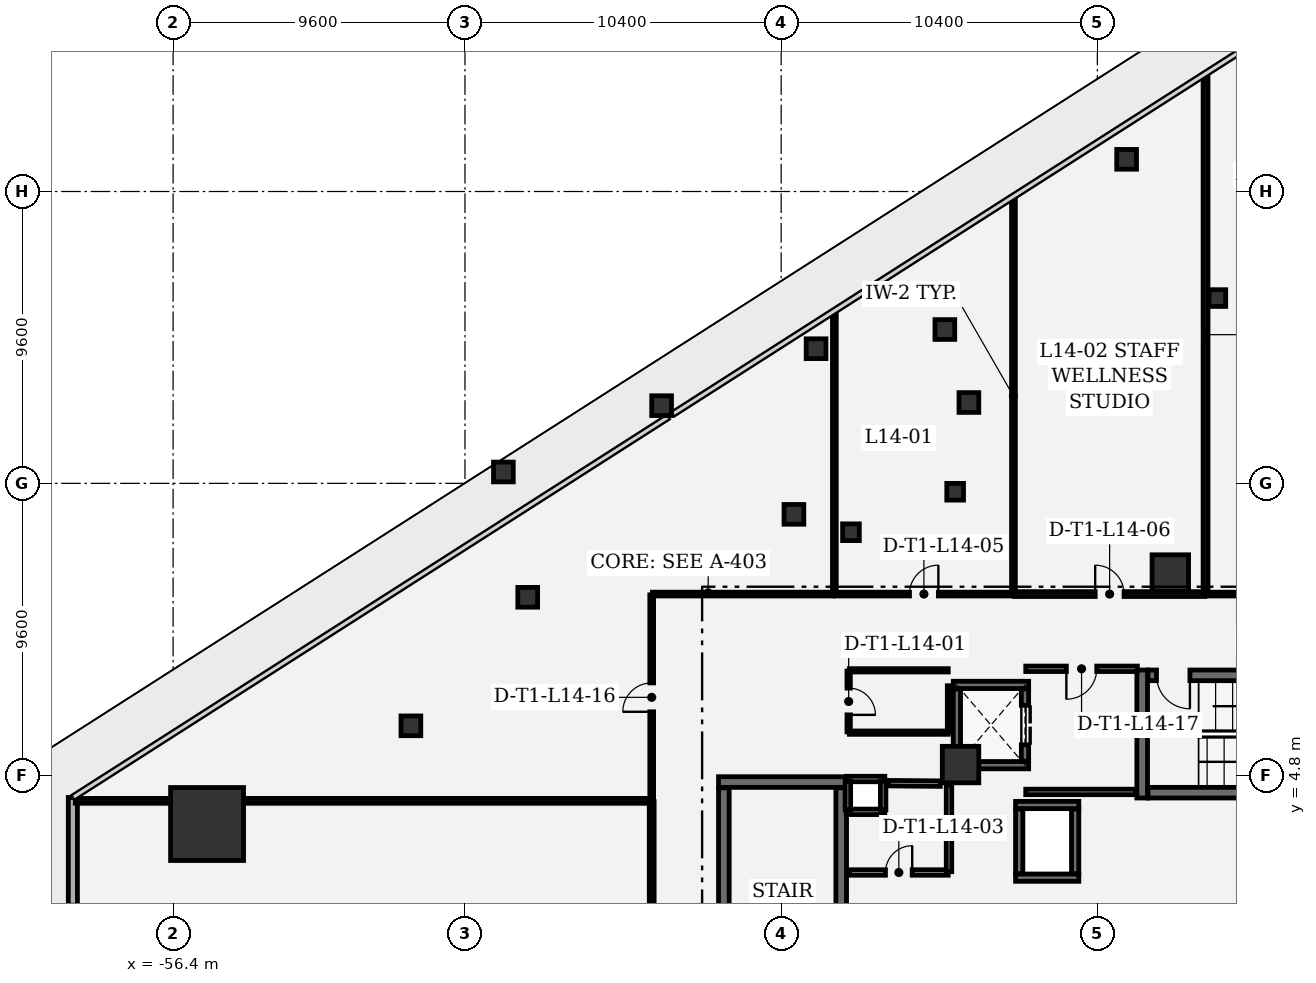
"""IFC4 building model, lengths in metres.
Left out: names, types, materials, properties, quantities, classifications, styles, units other than length and angle.
Written with IfcOpenShell. Run it as: python <this file> out.ifc"""

import sys

from ifc_helpers import new_model, si_unit, direction, frame, frame_2d, origin, origin_2d, place, context, subcontext, project, spatial, rectangle, extrude, element, fill, save


model = new_model("IFC4")
c1 = context("Model", 3, precision=1e-05, world=origin(), true_north=direction((0.0, 1.0)))
c2 = subcontext(c1, "Body", "Model", "MODEL_VIEW")
j1 = project(units=[si_unit("LENGTHUNIT", "METRE"), si_unit("PLANEANGLEUNIT", "RADIAN")], contexts=[c1])
p1 = place(None, origin())
s1 = spatial("IfcSite", under=j1, at=p1, CompositionType="ELEMENT")
p2 = place(p1, origin())
s2 = spatial("IfcBuilding", under=s1, at=p2, CompositionType="ELEMENT")
p3 = place(p2, frame((0.0, 0.0, 66.0)))
s3 = spatial("IfcBuildingStorey", under=s2, at=p3, CompositionType="ELEMENT", Elevation=66.0)
p4 = place(p3, frame((-55.283, 3.195, 0.0), z_axis=(0.0, 0.0, 1.0), x_axis=(1.0, 0.0, 0.0)))
e1 = element("IfcColumn", 1, at=p4, inside=s3, PredefinedType="COLUMN", context=c2, shape_type="SweptSolid", body=[
    extrude(rectangle(XDim=2.4, YDim=2.4, at=origin_2d()), origin(), (0.0, 0.0, 1.0), 4.2),
])
for number, where, z_axis, x_axis in (
    (2, (-23.6, 11.45, 0.0), (0.0, 0.0, 1.0), (1.0, 0.0, 0.0)),
    (3, (-30.5, 5.15, 0.0), (0.0, 0.0, 1.0), (1.0, 0.0, 0.0)),
):
    element("IfcColumn", number, at=place(p3, frame(where, z_axis=z_axis, x_axis=x_axis)), inside=s3, PredefinedType="COLUMN", context=c2, shape_type="SweptSolid", body=[
        extrude(rectangle(XDim=1.2, YDim=1.2, at=origin_2d()), origin(), (0.0, 0.0, 1.0), 4.2),
    ])
for number, where, z_axis, x_axis in (
    (4, (-45.536, 14.775, 0.0), (0.0, 0.0, 1.0), (1.0, 0.0, 0.0)),
    (5, (-40.333, 16.956, 0.0), (0.0, 0.0, 1.0), (1.0, 0.0, 0.0)),
    (6, (-35.252, 18.829, 0.0), (0.0, 0.0, 1.0), (1.0, 0.0, 0.0)),
    (7, (-25.038, 25.059, 0.0), (0.0, 0.0, 1.0), (1.0, 0.0, 0.0)),
    (8, (-31.016, 19.46, 0.0), (0.0, 0.0, 1.0), (1.0, 0.0, 0.0)),
    (9, (-44.736, 10.652, 0.0), (0.0, 0.0, 1.0), (1.0, 0.0, 0.0)),
    (10, (-48.578, 6.425, 0.0), (0.0, 0.0, 1.0), (1.0, 0.0, 0.0)),
    (11, (-35.981, 13.381, 0.0), (0.0, 0.0, 1.0), (1.0, 0.0, 0.0)),
    (12, (-30.225, 17.06, 0.0), (0.0, 0.0, 1.0), (1.0, 0.0, 0.0)),
):
    element("IfcColumn", number, at=place(p3, frame(where, z_axis=z_axis, x_axis=x_axis)), inside=s3, PredefinedType="COLUMN", context=c2, shape_type="SweptSolid", body=[
        extrude(rectangle(XDim=0.65, YDim=0.65, at=origin_2d()), origin(), (0.0, 0.0, 1.0), 4.2),
    ])
for number, where, z_axis, x_axis in (
    (13, (-34.104, 12.792, 0.0), (0.0, 0.0, 1.0), (1.0, 0.0, 0.0)),
    (14, (-22.053, 20.495, 0.0), (0.0, 0.0, 1.0), (1.0, 0.0, 0.0)),
    (15, (-30.677, 14.124, 0.0), (0.0, 0.0, 1.0), (1.0, 0.0, 0.0)),
):
    element("IfcColumn", number, at=place(p3, frame(where, z_axis=z_axis, x_axis=x_axis)), inside=s3, PredefinedType="COLUMN", context=c2, shape_type="SweptSolid", body=[
        extrude(rectangle(XDim=0.55, YDim=0.55, at=origin_2d()), origin(), (0.0, 0.0, 1.0), 4.2),
    ])
p5 = place(p3, frame((-59.697, -4.067, 0.0), z_axis=(0.0, 0.0, 1.0), x_axis=(0.0, 1.0, 0.0)))
e16 = element("IfcWall", 16, at=p5, inside=s3, PredefinedType="SOLIDWALL", context=c2, shape_type="SweptSolid", body=[
    extrude(rectangle(XDim=8.134, YDim=0.3, at=frame_2d((4.067, 0.0))), origin(), (0.0, 0.0, 1.0), 3.92),
])
p6 = place(p5, frame((3.542, 0.0, 0.0)))
e17 = element("IfcOpeningElement", 17, at=p6, cuts=e16, PredefinedType="OPENING", context=c2, shape_type="SweptSolid", body=[
    extrude(rectangle(XDim=1.05, YDim=2.2, at=frame_2d((0.525, 1.1))), frame((0.0, 0.16, 0.0), z_axis=(0.0, -1.0, 0.0), x_axis=(1.0, 0.0, 0.0)), (0.0, 0.0, 1.0), 0.32),
])
p7 = place(p3, frame((-24.525, 8.26, 0.0), z_axis=(0.0, 0.0, 1.0), x_axis=(0.0, -1.0, 0.0)))
e18 = element("IfcWall", 18, at=p7, inside=s3, PredefinedType="SHEAR", context=c2, shape_type="SweptSolid", body=[
    extrude(rectangle(XDim=4.21, YDim=0.35, at=frame_2d((2.105, 0.0))), origin(), (0.0, 0.0, 1.0), 3.92),
])
p8 = place(p3, frame((-24.335, 4.225, 0.0), z_axis=(0.0, 0.0, 1.0), x_axis=(1.0, 0.0, 0.0)))
e19 = element("IfcWall", 19, at=p8, inside=s3, PredefinedType="SHEAR", context=c2, shape_type="SweptSolid", body=[
    extrude(rectangle(XDim=8.12, YDim=0.35, at=frame_2d((4.06, 0.0))), origin(), (0.0, 0.0, 1.0), 3.92),
])
p9 = place(p3, frame((-16.215, 8.085, 0.0), z_axis=(0.0, 0.0, 1.0), x_axis=(-1.0, 0.0, 0.0)))
e20 = element("IfcWall", 20, at=p9, inside=s3, PredefinedType="SHEAR", context=c2, shape_type="SweptSolid", body=[
    extrude(rectangle(XDim=8.12, YDim=0.35, at=frame_2d((4.06, 0.0))), origin(), (0.0, 0.0, 1.0), 3.92),
])
p10 = place(p9, frame((6.74, 0.0, 0.0)))
e21 = element("IfcOpeningElement", 21, at=p10, cuts=e20, PredefinedType="OPENING", context=c2, shape_type="SweptSolid", body=[
    extrude(rectangle(XDim=1.1, YDim=2.2, at=frame_2d((0.55, 1.1))), frame((0.0, 0.185, 0.0), z_axis=(0.0, -1.0, 0.0), x_axis=(1.0, 0.0, 0.0)), (0.0, 0.0, 1.0), 0.37),
])
p11 = place(p3, frame((-34.25, 4.575, 0.0), z_axis=(0.0, 0.0, 1.0), x_axis=(-1.0, 0.0, 0.0)))
e22 = element("IfcWall", 22, at=p11, inside=s3, PredefinedType="SHEAR", context=c2, shape_type="SweptSolid", body=[
    extrude(rectangle(XDim=4.21, YDim=0.35, at=frame_2d((2.105, 0.0))), origin(), (0.0, 0.0, 1.0), 3.92),
])
for number, where, z_axis, x_axis in (
    (23, (-34.425, -4.385, 0.0), (0.0, 0.0, 1.0), (0.0, 1.0, 0.0)),
    (24, (-38.285, 4.385, 0.0), (0.0, 0.0, 1.0), (0.0, -1.0, 0.0)),
):
    element("IfcWall", number, at=place(p3, frame(where, z_axis=z_axis, x_axis=x_axis)), inside=s3, PredefinedType="SHEAR", context=c2, shape_type="SweptSolid", body=[
        extrude(rectangle(XDim=8.77, YDim=0.35, at=frame_2d((4.385, 0.0))), origin(), (0.0, 0.0, 1.0), 3.92),
    ])
for number, where, z_axis, x_axis in (
    (25, (-28.26, 5.13, 0.0), (0.0, 0.0, 1.0), (-1.0, 0.0, 0.0)),
    (26, (-30.74, 7.77, 0.0), (0.0, 0.0, 1.0), (1.0, 0.0, 0.0)),
):
    element("IfcWall", number, at=place(p3, frame(where, z_axis=z_axis, x_axis=x_axis)), inside=s3, PredefinedType="SHEAR", context=c2, shape_type="SweptSolid", body=[
        extrude(rectangle(XDim=2.48, YDim=0.24, at=frame_2d((1.24, 0.0))), origin(), (0.0, 0.0, 1.0), 3.92),
    ])
p12 = place(p3, frame((-30.62, 5.262, 0.0), z_axis=(0.0, 0.0, 1.0), x_axis=(0.0, 1.0, 0.0)))
e27 = element("IfcWall", 27, at=p12, inside=s3, PredefinedType="SHEAR", context=c2, shape_type="SweptSolid", body=[
    extrude(rectangle(XDim=2.376, YDim=0.24, at=frame_2d((1.188, 0.0))), origin(), (0.0, 0.0, 1.0), 3.92),
])
p13 = place(p3, frame((-28.38, 7.638, 0.0), z_axis=(0.0, 0.0, 1.0), x_axis=(0.0, -1.0, 0.0)))
e28 = element("IfcWall", 28, at=p13, inside=s3, PredefinedType="SHEAR", context=c2, shape_type="SweptSolid", body=[
    extrude(rectangle(XDim=2.376, YDim=0.24, at=frame_2d((1.188, 0.0))), origin(), (0.0, 0.0, 1.0), 3.92),
])
p14 = place(p13, frame((0.538, 0.0, 0.0)))
e29 = element("IfcOpeningElement", 29, at=p14, cuts=e28, PredefinedType="OPENING", context=c2, shape_type="SweptSolid", body=[
    extrude(rectangle(XDim=1.3, YDim=2.3, at=frame_2d((0.65, 1.15))), frame((0.0, 0.13, 0.0), z_axis=(0.0, -1.0, 0.0), x_axis=(1.0, 0.0, 0.0)), (0.0, 0.0, 1.0), 0.26),
])
for number, where, z_axis, x_axis in (
    (30, (-26.61, 1.43, 0.0), (0.0, 0.0, 1.0), (-1.0, 0.0, 0.0)),
    (31, (-28.69, 3.82, 0.0), (0.0, 0.0, 1.0), (1.0, 0.0, 0.0)),
):
    element("IfcWall", number, at=place(p3, frame(where, z_axis=z_axis, x_axis=x_axis)), inside=s3, PredefinedType="SHEAR", context=c2, shape_type="SweptSolid", body=[
        extrude(rectangle(XDim=2.08, YDim=0.24, at=frame_2d((1.04, 0.0))), origin(), (0.0, 0.0, 1.0), 3.92),
    ])
for number, where, z_axis, x_axis in (
    (32, (-28.57, 1.562, 0.0), (0.0, 0.0, 1.0), (0.0, 1.0, 0.0)),
    (33, (-26.73, 3.688, 0.0), (0.0, 0.0, 1.0), (0.0, -1.0, 0.0)),
):
    element("IfcWall", number, at=place(p3, frame(where, z_axis=z_axis, x_axis=x_axis)), inside=s3, PredefinedType="SHEAR", context=c2, shape_type="SweptSolid", body=[
        extrude(rectangle(XDim=2.126, YDim=0.24, at=frame_2d((1.063, 0.0))), origin(), (0.0, 0.0, 1.0), 3.92),
    ])
for number, where, z_axis, x_axis in (
    (34, (-32.99, 3.595, 0.0), (0.0, 0.0, 1.0), (-1.0, 0.0, 0.0)),
    (35, (-34.26, 4.675, 0.0), (0.0, 0.0, 1.0), (1.0, 0.0, 0.0)),
):
    element("IfcWall", number, at=place(p3, frame(where, z_axis=z_axis, x_axis=x_axis)), inside=s3, PredefinedType="PARTITIONING", context=c2, shape_type="SweptSolid", body=[
        extrude(rectangle(XDim=1.27, YDim=0.18, at=frame_2d((0.635, 0.0))), origin(), (0.0, 0.0, 1.0), 3.92),
    ])
for number, where, z_axis, x_axis in (
    (36, (-34.205, 3.66, 0.0), (0.0, 0.0, 1.0), (0.0, 1.0, 0.0)),
    (37, (-33.045, 4.61, 0.0), (0.0, 0.0, 1.0), (0.0, -1.0, 0.0)),
):
    element("IfcWall", number, at=place(p3, frame(where, z_axis=z_axis, x_axis=x_axis)), inside=s3, PredefinedType="PARTITIONING", context=c2, shape_type="SweptSolid", body=[
        extrude(rectangle(XDim=0.95, YDim=0.18, at=frame_2d((0.475, 0.0))), origin(), (0.0, 0.0, 1.0), 3.92),
    ])
p15 = place(p3, frame((-28.355, 4.25, 0.0), z_axis=(0.0, 0.0, 1.0), x_axis=(1.0, 0.0, 0.0)))
e38 = element("IfcWall", 38, at=p15, inside=s3, PredefinedType="PARTITIONING", context=c2, shape_type="SweptSolid", body=[
    extrude(rectangle(XDim=3.622, YDim=0.18, at=frame_2d((1.811, 0.0))), origin(), (0.0, 0.0, 1.0), 3.92),
])
p16 = place(p3, frame((-24.684, 8.3, 0.0), z_axis=(0.0, 0.0, 1.0), x_axis=(-1.0, 0.0, 0.0)))
e39 = element("IfcWall", 39, at=p16, inside=s3, PredefinedType="PARTITIONING", context=c2, shape_type="SweptSolid", body=[
    extrude(rectangle(XDim=3.671, YDim=0.18, at=frame_2d((1.835, 0.0))), origin(), (0.0, 0.0, 1.0), 3.92),
])
p17 = place(p16, frame((1.335, 0.0, 0.0)))
e40 = element("IfcOpeningElement", 40, at=p17, cuts=e39, PredefinedType="OPENING", context=c2, shape_type="SweptSolid", body=[
    extrude(rectangle(XDim=1.0, YDim=2.15, at=frame_2d((0.5, 1.075))), frame((0.0, 0.1, 0.0), z_axis=(0.0, -1.0, 0.0), x_axis=(1.0, 0.0, 0.0)), (0.0, 0.0, 1.0), 0.2),
])
p18 = place(p3, frame((-34.18, 8.225, 0.0), z_axis=(0.0, 0.0, 1.0), x_axis=(0.0, -1.0, 0.0)))
e41 = element("IfcWall", 41, at=p18, inside=s3, PredefinedType="PARTITIONING", context=c2, shape_type="SweptSolid", body=[
    extrude(rectangle(XDim=2.0, YDim=0.11, at=frame_2d((1.0, 0.0))), origin(), (0.0, 0.0, 1.0), 3.92),
])
p19 = place(p18, frame((0.56, 0.0, 0.0)))
e42 = element("IfcOpeningElement", 42, at=p19, cuts=e41, PredefinedType="OPENING", context=c2, shape_type="SweptSolid", body=[
    extrude(rectangle(XDim=0.88, YDim=2.1, at=frame_2d((0.44, 1.05))), frame((0.0, 0.065, 0.0), z_axis=(0.0, -1.0, 0.0), x_axis=(1.0, 0.0, 0.0)), (0.0, 0.0, 1.0), 0.13),
])
p20 = place(p3, frame((-34.155, 6.2, 0.0), z_axis=(0.0, 0.0, 1.0), x_axis=(1.0, 0.0, 0.0)))
e43 = element("IfcWall", 43, at=p20, inside=s3, PredefinedType="PARTITIONING", context=c2, shape_type="SweptSolid", body=[
    extrude(rectangle(XDim=3.25, YDim=0.11, at=frame_2d((1.625, 0.0))), origin(), (0.0, 0.0, 1.0), 3.433),
])
p21 = place(p3, frame((-30.88, 6.225, 0.0), z_axis=(0.0, 0.0, 1.0), x_axis=(0.0, 1.0, 0.0)))
e44 = element("IfcWall", 44, at=p21, inside=s3, PredefinedType="PARTITIONING", context=c2, shape_type="SweptSolid", body=[
    extrude(rectangle(XDim=1.518, YDim=0.11, at=frame_2d((0.759, 0.0))), origin(), (0.0, 0.0, 1.0), 3.92),
])
p22 = place(p3, frame((-30.905, 8.25, 0.0), z_axis=(0.0, 0.0, 1.0), x_axis=(-1.0, 0.0, 0.0)))
e45 = element("IfcWall", 45, at=p22, inside=s3, PredefinedType="PARTITIONING", context=c2, shape_type="SweptSolid", body=[
    extrude(rectangle(XDim=3.25, YDim=0.11, at=frame_2d((1.625, 0.0))), origin(), (0.0, 0.0, 1.0), 3.92),
])
p23 = place(p3, frame((-34.155, 1.6, 0.0), z_axis=(0.0, 0.0, 1.0), x_axis=(1.0, 0.0, 0.0)))
e46 = element("IfcWall", 46, at=p23, inside=s3, PredefinedType="PARTITIONING", context=c2, shape_type="SweptSolid", body=[
    extrude(rectangle(XDim=3.25, YDim=0.18, at=frame_2d((1.625, 0.0))), origin(), (0.0, 0.0, 1.0), 3.92),
])
p24 = place(p23, frame((1.185, 0.0, 0.0)))
e47 = element("IfcOpeningElement", 47, at=p24, cuts=e46, PredefinedType="OPENING", context=c2, shape_type="SweptSolid", body=[
    extrude(rectangle(XDim=0.88, YDim=2.1, at=frame_2d((0.44, 1.05))), frame((0.0, 0.1, 0.0), z_axis=(0.0, -1.0, 0.0), x_axis=(1.0, 0.0, 0.0)), (0.0, 0.0, 1.0), 0.2),
])
p25 = place(p3, frame((-30.88, 1.625, 0.0), z_axis=(0.0, 0.0, 1.0), x_axis=(0.0, 1.0, 0.0)))
e48 = element("IfcWall", 48, at=p25, inside=s3, PredefinedType="PARTITIONING", context=c2, shape_type="SweptSolid", body=[
    extrude(rectangle(XDim=2.86, YDim=0.18, at=frame_2d((1.43, 0.0))), origin(), (0.0, 0.0, 1.0), 3.92),
])
p26 = place(p3, frame((-31.165, 4.522, 0.0), z_axis=(0.0, 0.0, 1.0), x_axis=(-0.9999584918, 0.009111239105, 0.0)))
e49 = element("IfcWall", 49, at=p26, inside=s3, PredefinedType="PARTITIONING", context=c2, shape_type="SweptSolid", body=[
    extrude(rectangle(XDim=1.715, YDim=0.18, at=frame_2d((0.857, 0.0))), origin(), (0.0, 0.0, 1.0), 3.92),
])
p27 = place(p3, frame((-34.625, 10.758, 0.0), z_axis=(0.0, 0.0, 1.0), x_axis=(1.0, 0.0, 0.0)))
e50 = element("IfcWall", 50, at=p27, inside=s3, PredefinedType="PARTITIONING", context=c2, shape_type="SweptSolid", body=[
    extrude(rectangle(XDim=5.841, YDim=0.125, at=frame_2d((2.92, 0.0))), origin(), (0.0, 0.0, 1.0), 3.433),
])
p28 = place(p27, frame((2.445, 0.0, 0.0)))
e51 = element("IfcOpeningElement", 51, at=p28, cuts=e50, PredefinedType="OPENING", context=c2, shape_type="SweptSolid", body=[
    extrude(rectangle(XDim=0.95, YDim=2.15, at=frame_2d((0.475, 1.075))), frame((0.0, 0.073, 0.0), z_axis=(0.0, -1.0, 0.0), x_axis=(1.0, 0.0, 0.0)), (0.0, 0.0, 1.0), 0.145),
])
p29 = place(p3, frame((-28.76, 10.783, 0.0), z_axis=(0.0, 0.0, 1.0), x_axis=(0.0, 1.0, 0.0)))
e52 = element("IfcWall", 52, at=p29, inside=s3, PredefinedType="PARTITIONING", context=c2, shape_type="SweptSolid", body=[
    extrude(rectangle(XDim=12.977, YDim=0.125, at=frame_2d((6.488, 0.0))), origin(), (0.0, 0.0, 1.0), 3.92),
])
p30 = place(p3, frame((-34.65, 19.995, 0.0), z_axis=(0.0, 0.0, 1.0), x_axis=(0.0, -1.0, 0.0)))
e53 = element("IfcWall", 53, at=p30, inside=s3, PredefinedType="PARTITIONING", context=c2, shape_type="SweptSolid", body=[
    extrude(rectangle(XDim=9.212, YDim=0.125, at=frame_2d((4.606, 0.0))), origin(), (0.0, 0.0, 1.0), 3.92),
])
p31 = place(p3, frame((-28.727, 10.758, 0.0), z_axis=(0.0, 0.0, 1.0), x_axis=(1.0, 0.0, 0.0)))
e54 = element("IfcWall", 54, at=p31, inside=s3, PredefinedType="PARTITIONING", context=c2, shape_type="SweptSolid", body=[
    extrude(rectangle(XDim=6.26, YDim=0.16, at=frame_2d((3.13, 0.0))), origin(), (0.0, 0.0, 1.0), 3.92),
])
p32 = place(p31, frame((2.655, 0.0, 0.0)))
e55 = element("IfcOpeningElement", 55, at=p32, cuts=e54, PredefinedType="OPENING", context=c2, shape_type="SweptSolid", body=[
    extrude(rectangle(XDim=0.95, YDim=2.15, at=frame_2d((0.475, 1.075))), frame((0.0, 0.09, 0.0), z_axis=(0.0, -1.0, 0.0), x_axis=(1.0, 0.0, 0.0)), (0.0, 0.0, 1.0), 0.18),
])
p33 = place(p3, frame((-22.441, 10.783, 0.0), z_axis=(0.0, 0.0, 1.0), x_axis=(0.0, 1.0, 0.0)))
e56 = element("IfcWall", 56, at=p33, inside=s3, PredefinedType="PARTITIONING", context=c2, shape_type="SweptSolid", body=[
    extrude(rectangle(XDim=17.015, YDim=0.16, at=frame_2d((8.508, 0.0))), origin(), (0.0, 0.0, 1.0), 2.957),
])
p34 = place(p3, frame((-22.408, 10.758, 0.0), z_axis=(0.0, 0.0, 1.0), x_axis=(1.0, 0.0, 0.0)))
e57 = element("IfcWall", 57, at=p34, inside=s3, PredefinedType="PARTITIONING", context=c2, shape_type="SweptSolid", body=[
    extrude(rectangle(XDim=4.802, YDim=0.125, at=frame_2d((2.401, 0.0))), origin(), (0.0, 0.0, 1.0), 3.92),
])
p35 = place(p34, frame((1.926, 0.0, 0.0)))
e58 = element("IfcOpeningElement", 58, at=p35, cuts=e57, PredefinedType="OPENING", context=c2, shape_type="SweptSolid", body=[
    extrude(rectangle(XDim=0.95, YDim=2.15, at=frame_2d((0.475, 1.075))), frame((0.0, 0.073, 0.0), z_axis=(0.0, -1.0, 0.0), x_axis=(1.0, 0.0, 0.0)), (0.0, 0.0, 1.0), 0.145),
])
p36 = place(p3, frame((-40.658, -7.824, 0.0), z_axis=(0.0, 0.0, 1.0), x_axis=(0.0, 1.0, 0.0)))
e59 = element("IfcWall", 59, at=p36, inside=s3, PredefinedType="PARTITIONING", context=c2, shape_type="SweptSolid", body=[
    extrude(rectangle(XDim=11.756, YDim=0.16, at=frame_2d((5.878, 0.0))), origin(), (0.0, 0.0, 1.0), 3.92),
])
p37 = place(p36, frame((5.328, 0.0, 0.0)))
e60 = element("IfcOpeningElement", 60, at=p37, cuts=e59, PredefinedType="OPENING", context=c2, shape_type="SweptSolid", body=[
    extrude(rectangle(XDim=1.1, YDim=2.15, at=frame_2d((0.55, 1.075))), frame((0.0, 0.09, 0.0), z_axis=(0.0, -1.0, 0.0), x_axis=(1.0, 0.0, 0.0)), (0.0, 0.0, 1.0), 0.18),
])
p38 = place(p3, frame((-40.683, 3.957, 0.0), z_axis=(0.0, 0.0, 1.0), x_axis=(-1.0, 0.0, 0.0)))
e61 = element("IfcWall", 61, at=p38, inside=s3, PredefinedType="PARTITIONING", context=c2, shape_type="SweptSolid", body=[
    extrude(rectangle(XDim=13.335, YDim=0.16, at=frame_2d((6.667, 0.0))), origin(), (0.0, 0.0, 1.0), 2.89),
])
p39 = place(p3, frame((-56.548, 3.957, 0.0), z_axis=(0.0, 0.0, 1.0), x_axis=(-1.0, 0.0, 0.0)))
e62 = element("IfcWall", 62, at=p39, inside=s3, PredefinedType="PARTITIONING", context=c2, shape_type="SweptSolid", body=[
    extrude(rectangle(XDim=3.069, YDim=0.16, at=frame_2d((1.535, 0.0))), origin(), (0.0, 0.0, 1.0), 3.92),
])
p40 = place(p3, frame((-40.658, 3.99, 0.0), z_axis=(0.0, 0.0, 1.0), x_axis=(0.0, 1.0, 0.0)))
e63 = element("IfcWall", 63, at=p40, inside=s3, PredefinedType="PARTITIONING", context=c2, shape_type="SweptSolid", body=[
    extrude(rectangle(XDim=6.744, YDim=0.125, at=frame_2d((3.372, 0.0))), origin(), (0.0, 0.0, 1.0), 3.92),
])
p41 = place(p40, frame((2.897, 0.0, 0.0)))
e64 = element("IfcOpeningElement", 64, at=p41, cuts=e63, PredefinedType="OPENING", context=c2, shape_type="SweptSolid", body=[
    extrude(rectangle(XDim=0.95, YDim=2.15, at=frame_2d((0.475, 1.075))), frame((0.0, 0.073, 0.0), z_axis=(0.0, -1.0, 0.0), x_axis=(1.0, 0.0, 0.0)), (0.0, 0.0, 1.0), 0.145),
])
p42 = place(p3, frame((-34.683, 10.758, 0.0), z_axis=(0.0, 0.0, 1.0), x_axis=(-1.0, 0.0, 0.0)))
e65 = element("IfcWall", 65, at=p42, inside=s3, PredefinedType="PARTITIONING", context=c2, shape_type="SweptSolid", body=[
    extrude(rectangle(XDim=5.95, YDim=0.125, at=frame_2d((2.975, 0.0))), origin(), (0.0, 0.0, 1.0), 3.433),
])
p43 = place(p10, origin())
e66 = element("IfcDoor", 66, at=p43, inside=s3, OperationType="SINGLE_SWING_LEFT", PredefinedType="DOOR", context=c2, shape_type="SweptSolid", body=[
    extrude(rectangle(XDim=1.1, YDim=2.2, at=frame_2d((0.55, 1.1))), frame((0.0, 0.025, 0.0), z_axis=(0.0, -1.0, 0.0), x_axis=(1.0, 0.0, 0.0)), (0.0, 0.0, 1.0), 0.05),
])
fill(e21, e66)
p44 = place(p14, origin())
e67 = element("IfcDoor", 67, at=p44, inside=s3, OperationType="DOUBLE_DOOR_SLIDING", PredefinedType="DOOR", context=c2, shape_type="SweptSolid", body=[
    extrude(rectangle(XDim=1.3, YDim=2.3, at=frame_2d((0.65, 1.15))), frame((0.0, 0.025, 0.0), z_axis=(0.0, -1.0, 0.0), x_axis=(1.0, 0.0, 0.0)), (0.0, 0.0, 1.0), 0.05),
])
fill(e29, e67)
p45 = place(p19, origin())
e68 = element("IfcDoor", 68, at=p45, inside=s3, OperationType="SINGLE_SWING_RIGHT", PredefinedType="DOOR", context=c2, shape_type="SweptSolid", body=[
    extrude(rectangle(XDim=0.88, YDim=2.1, at=frame_2d((0.44, 1.05))), frame((0.0, 0.025, 0.0), z_axis=(0.0, -1.0, 0.0), x_axis=(1.0, 0.0, 0.0)), (0.0, 0.0, 1.0), 0.05),
])
fill(e42, e68)
p46 = place(p24, origin())
e69 = element("IfcDoor", 69, at=p46, inside=s3, OperationType="SINGLE_SWING_RIGHT", PredefinedType="DOOR", context=c2, shape_type="SweptSolid", body=[
    extrude(rectangle(XDim=0.88, YDim=2.1, at=frame_2d((0.44, 1.05))), frame((0.0, 0.025, 0.0), z_axis=(0.0, -1.0, 0.0), x_axis=(1.0, 0.0, 0.0)), (0.0, 0.0, 1.0), 0.05),
])
fill(e47, e69)
p47 = place(p28, origin())
e70 = element("IfcDoor", 70, at=p47, inside=s3, OperationType="SINGLE_SWING_RIGHT", PredefinedType="DOOR", context=c2, shape_type="SweptSolid", body=[
    extrude(rectangle(XDim=0.95, YDim=2.15, at=frame_2d((0.475, 1.075))), frame((0.0, 0.025, 0.0), z_axis=(0.0, -1.0, 0.0), x_axis=(1.0, 0.0, 0.0)), (0.0, 0.0, 1.0), 0.05),
])
fill(e51, e70)
p48 = place(p32, origin())
e71 = element("IfcDoor", 71, at=p48, inside=s3, OperationType="SINGLE_SWING_LEFT", PredefinedType="DOOR", context=c2, shape_type="SweptSolid", body=[
    extrude(rectangle(XDim=0.95, YDim=2.15, at=frame_2d((0.475, 1.075))), frame((0.0, 0.025, 0.0), z_axis=(0.0, -1.0, 0.0), x_axis=(1.0, 0.0, 0.0)), (0.0, 0.0, 1.0), 0.05),
])
fill(e55, e71)
p49 = place(p41, origin())
e72 = element("IfcDoor", 72, at=p49, inside=s3, OperationType="SINGLE_SWING_LEFT", PredefinedType="DOOR", context=c2, shape_type="SweptSolid", body=[
    extrude(rectangle(XDim=0.95, YDim=2.15, at=frame_2d((0.475, 1.075))), frame((0.0, 0.025, 0.0), z_axis=(0.0, -1.0, 0.0), x_axis=(1.0, 0.0, 0.0)), (0.0, 0.0, 1.0), 0.05),
])
fill(e64, e72)
p50 = place(p17, origin())
e73 = element("IfcDoor", 73, at=p50, inside=s3, OperationType="SINGLE_SWING_RIGHT", PredefinedType="DOOR", context=c2, shape_type="SweptSolid", body=[
    extrude(rectangle(XDim=1.0, YDim=2.15, at=frame_2d((0.5, 1.075))), frame((0.0, 0.025, 0.0), z_axis=(0.0, -1.0, 0.0), x_axis=(1.0, 0.0, 0.0)), (0.0, 0.0, 1.0), 0.05),
])
fill(e40, e73)
save(model, sys.argv[1])
